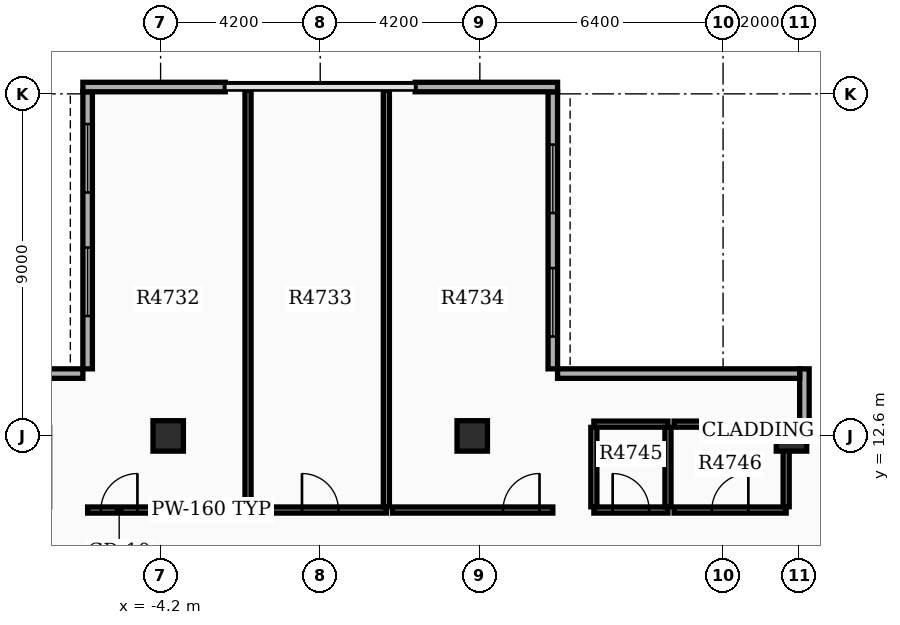
"""IFC4 building model, lengths in metres.
Left out: names, types, materials, properties, quantities, classifications, styles, units other than length and angle.
Written with IfcOpenShell. Run it as: python <this file> out.ifc"""

import sys

from ifc_helpers import new_model, si_unit, direction, frame, frame_2d, origin, origin_2d, place, context, subcontext, project, spatial, rectangle, extrude, element, fill, save


model = new_model("IFC4")
c1 = context("Model", 3, precision=1e-05, world=origin(), true_north=direction((0.0, 1.0)))
c2 = subcontext(c1, "Body", "Model", "MODEL_VIEW")
j1 = project(units=[si_unit("LENGTHUNIT", "METRE"), si_unit("PLANEANGLEUNIT", "RADIAN")], contexts=[c1])
p1 = place(None, origin())
s1 = spatial("IfcSite", under=j1, at=p1, CompositionType="ELEMENT")
p2 = place(p1, origin())
s2 = spatial("IfcBuilding", under=s1, at=p2, CompositionType="ELEMENT")
p3 = place(p2, frame((0.0, 0.0, 308.4)))
s3 = spatial("IfcBuildingStorey", under=s2, at=p3, CompositionType="ELEMENT", Elevation=308.4)
for number, where, z_axis, x_axis in (
    (1, (12.4, 12.6, 0.0), (0.0, 0.0, 1.0), (1.0, 0.0, 0.0)),
    (2, (4.0, 12.6, 0.0), (0.0, 0.0, 1.0), (1.0, 0.0, 0.0)),
    (3, (-4.0, 12.6, 0.0), (0.0, 0.0, 1.0), (1.0, 0.0, 0.0)),
):
    element("IfcColumn", number, at=place(p3, frame(where, z_axis=z_axis, x_axis=x_axis)), inside=s3, PredefinedType="COLUMN", context=c2, shape_type="SweptSolid", body=[
        extrude(rectangle(XDim=0.8, YDim=0.8, at=origin_2d()), origin(), (0.0, 0.0, 1.0), 4.5),
    ])
p4 = place(p3, frame((6.12, 14.365, 0.0), z_axis=(0.0, 0.0, 1.0), x_axis=(0.0, 1.0, 0.0)))
e4 = element("IfcWall", 4, at=p4, inside=s3, PredefinedType="STANDARD", context=c2, shape_type="SweptSolid", body=[
    extrude(rectangle(XDim=7.29, YDim=0.25, at=frame_2d((3.645, 0.0))), origin(), (0.0, 0.0, 1.0), 3.73),
])
p5 = place(p4, frame((0.85, 0.0, 0.8)))
e5 = element("IfcOpeningElement", 5, at=p5, cuts=e4, PredefinedType="OPENING", context=c2, shape_type="SweptSolid", body=[
    extrude(rectangle(XDim=1.8, YDim=1.8, at=frame_2d((0.9, 0.9))), frame((0.0, 0.135, 0.0), z_axis=(0.0, -1.0, 0.0), x_axis=(1.0, 0.0, 0.0)), (0.0, 0.0, 1.0), 0.27),
])
p6 = place(p4, frame((4.1, 0.0, 0.8)))
e6 = element("IfcOpeningElement", 6, at=p6, cuts=e4, PredefinedType="OPENING", context=c2, shape_type="SweptSolid", body=[
    extrude(rectangle(XDim=1.8, YDim=1.8, at=frame_2d((0.9, 0.9))), frame((0.0, 0.135, 0.0), z_axis=(0.0, -1.0, 0.0), x_axis=(1.0, 0.0, 0.0)), (0.0, 0.0, 1.0), 0.27),
])
p7 = place(p3, frame((-6.12, 21.655, 0.0), z_axis=(0.0, 0.0, 1.0), x_axis=(0.0, -1.0, 0.0)))
e7 = element("IfcWall", 7, at=p7, inside=s3, PredefinedType="STANDARD", context=c2, shape_type="SweptSolid", body=[
    extrude(rectangle(XDim=7.29, YDim=0.25, at=frame_2d((3.645, 0.0))), origin(), (0.0, 0.0, 1.0), 3.73),
])
p8 = place(p7, frame((0.85, 0.0, 0.8)))
e8 = element("IfcOpeningElement", 8, at=p8, cuts=e7, PredefinedType="OPENING", context=c2, shape_type="SweptSolid", body=[
    extrude(rectangle(XDim=1.8, YDim=1.8, at=frame_2d((0.9, 0.9))), frame((0.0, 0.135, 0.0), z_axis=(0.0, -1.0, 0.0), x_axis=(1.0, 0.0, 0.0)), (0.0, 0.0, 1.0), 0.27),
])
p9 = place(p7, frame((4.1, 0.0, 0.8)))
e9 = element("IfcOpeningElement", 9, at=p9, cuts=e7, PredefinedType="OPENING", context=c2, shape_type="SweptSolid", body=[
    extrude(rectangle(XDim=1.8, YDim=1.8, at=frame_2d((0.9, 0.9))), frame((0.0, 0.135, 0.0), z_axis=(0.0, -1.0, 0.0), x_axis=(1.0, 0.0, 0.0)), (0.0, 0.0, 1.0), 0.27),
])
for number, where, z_axis, x_axis in (
    (10, (6.245, 21.78, 0.0), (0.0, 0.0, 1.0), (-1.0, 0.0, 0.0)),
    (11, (-2.498, 21.78, 0.0), (0.0, 0.0, 1.0), (-1.0, 0.0, 0.0)),
):
    element("IfcWall", number, at=place(p3, frame(where, z_axis=z_axis, x_axis=x_axis)), inside=s3, PredefinedType="STANDARD", context=c2, shape_type="SweptSolid", body=[
        extrude(rectangle(XDim=3.747, YDim=0.25, at=frame_2d((1.874, 0.0))), origin(), (0.0, 0.0, 1.0), 3.73),
    ])
p10 = place(p3, frame((14.115, 12.74, 0.0), z_axis=(0.0, 0.0, 1.0), x_axis=(-1.0, 0.0, 0.0)))
e12 = element("IfcWall", 12, at=p10, inside=s3, PredefinedType="STANDARD", context=c2, shape_type="SweptSolid", body=[
    extrude(rectangle(XDim=1.25, YDim=0.25, at=frame_2d((0.625, 0.0))), origin(), (0.0, 0.0, 1.0), 3.73),
])
p11 = place(p3, frame((12.74, 12.865, 0.0), z_axis=(0.0, 0.0, 1.0), x_axis=(0.0, 1.0, 0.0)))
e13 = element("IfcWall", 13, at=p11, inside=s3, PredefinedType="STANDARD", context=c2, shape_type="SweptSolid", body=[
    extrude(rectangle(XDim=1.5, YDim=0.25, at=frame_2d((0.75, 0.0))), origin(), (0.0, 0.0, 1.0), 3.73),
])
for number, where, z_axis, x_axis in (
    (14, (12.615, 14.24, 0.0), (0.0, 0.0, 1.0), (-1.0, 0.0, 0.0)),
    (15, (-12.615, 14.24, 0.0), (0.0, 0.0, 1.0), (1.0, 0.0, 0.0)),
):
    element("IfcWall", number, at=place(p3, frame(where, z_axis=z_axis, x_axis=x_axis)), inside=s3, PredefinedType="STANDARD", context=c2, shape_type="SweptSolid", body=[
        extrude(rectangle(XDim=6.37, YDim=0.25, at=frame_2d((3.185, 0.0))), origin(), (0.0, 0.0, 1.0), 3.73),
    ])
p12 = place(p3, frame((-6.12, 10.65, 0.0), z_axis=(0.0, 0.0, 1.0), x_axis=(1.0, 0.0, 0.0)))
e16 = element("IfcWall", 16, at=p12, inside=s3, PredefinedType="PARTITIONING", context=c2, shape_type="SweptSolid", body=[
    extrude(rectangle(XDim=4.22, YDim=0.16, at=frame_2d((2.11, 0.0))), origin(), (0.0, 0.0, 1.0), 3.72),
])
p13 = place(p12, frame((0.35, 0.0, 0.0)))
e17 = element("IfcOpeningElement", 17, at=p13, cuts=e16, PredefinedType="OPENING", context=c2, shape_type="SweptSolid", body=[
    extrude(rectangle(XDim=0.96, YDim=2.15, at=frame_2d((0.48, 1.075))), frame((0.0, 0.09, 0.0), z_axis=(0.0, -1.0, 0.0), x_axis=(1.0, 0.0, 0.0)), (0.0, 0.0, 1.0), 0.18),
])
p14 = place(p3, frame((-1.9, 10.735, 0.0), z_axis=(0.0, 0.0, 1.0), x_axis=(0.0, 1.0, 0.0)))
e18 = element("IfcWall", 18, at=p14, inside=s3, PredefinedType="PARTITIONING", context=c2, shape_type="SweptSolid", body=[
    extrude(rectangle(XDim=10.96, YDim=0.16, at=frame_2d((5.48, 0.0))), origin(), (0.0, 0.0, 1.0), 3.72),
])
p15 = place(p3, frame((-1.74, 10.65, 0.0), z_axis=(0.0, 0.0, 1.0), x_axis=(1.0, 0.0, 0.0)))
e19 = element("IfcWall", 19, at=p15, inside=s3, PredefinedType="PARTITIONING", context=c2, shape_type="SweptSolid", body=[
    extrude(rectangle(XDim=3.48, YDim=0.16, at=frame_2d((1.74, 0.0))), origin(), (0.0, 0.0, 1.0), 3.72),
])
p16 = place(p15, frame((1.26, 0.0, 0.0)))
e20 = element("IfcOpeningElement", 20, at=p16, cuts=e19, PredefinedType="OPENING", context=c2, shape_type="SweptSolid", body=[
    extrude(rectangle(XDim=0.96, YDim=2.15, at=frame_2d((0.48, 1.075))), frame((0.0, 0.09, 0.0), z_axis=(0.0, -1.0, 0.0), x_axis=(1.0, 0.0, 0.0)), (0.0, 0.0, 1.0), 0.18),
])
p17 = place(p3, frame((1.74, 10.735, 0.0), z_axis=(0.0, 0.0, 1.0), x_axis=(0.0, 1.0, 0.0)))
e21 = element("IfcWall", 21, at=p17, inside=s3, PredefinedType="PARTITIONING", context=c2, shape_type="SweptSolid", body=[
    extrude(rectangle(XDim=10.96, YDim=0.16, at=frame_2d((5.48, 0.0))), origin(), (0.0, 0.0, 1.0), 3.72),
])
p18 = place(p3, frame((1.9, 10.65, 0.0), z_axis=(0.0, 0.0, 1.0), x_axis=(1.0, 0.0, 0.0)))
e22 = element("IfcWall", 22, at=p18, inside=s3, PredefinedType="PARTITIONING", context=c2, shape_type="SweptSolid", body=[
    extrude(rectangle(XDim=4.22, YDim=0.16, at=frame_2d((2.11, 0.0))), origin(), (0.0, 0.0, 1.0), 3.72),
])
p19 = place(p18, frame((2.91, 0.0, 0.0)))
e23 = element("IfcOpeningElement", 23, at=p19, cuts=e22, PredefinedType="OPENING", context=c2, shape_type="SweptSolid", body=[
    extrude(rectangle(XDim=0.96, YDim=2.15, at=frame_2d((0.48, 1.075))), frame((0.0, 0.09, 0.0), z_axis=(0.0, -1.0, 0.0), x_axis=(1.0, 0.0, 0.0)), (0.0, 0.0, 1.0), 0.18),
])
p20 = place(p3, frame((7.2, 10.65, 0.0), z_axis=(0.0, 0.0, 1.0), x_axis=(1.0, 0.0, 0.0)))
e24 = element("IfcWall", 24, at=p20, inside=s3, PredefinedType="PARTITIONING", context=c2, shape_type="SweptSolid", body=[
    extrude(rectangle(XDim=1.95, YDim=0.16, at=frame_2d((0.975, 0.0))), origin(), (0.0, 0.0, 1.0), 3.72),
])
p21 = place(p20, frame((0.495, 0.0, 0.0)))
e25 = element("IfcOpeningElement", 25, at=p21, cuts=e24, PredefinedType="OPENING", context=c2, shape_type="SweptSolid", body=[
    extrude(rectangle(XDim=0.96, YDim=2.15, at=frame_2d((0.48, 1.075))), frame((0.0, 0.09, 0.0), z_axis=(0.0, -1.0, 0.0), x_axis=(1.0, 0.0, 0.0)), (0.0, 0.0, 1.0), 0.18),
])
p22 = place(p3, frame((7.2, 12.91, 0.0), z_axis=(0.0, 0.0, 1.0), x_axis=(1.0, 0.0, 0.0)))
e26 = element("IfcWall", 26, at=p22, inside=s3, PredefinedType="PARTITIONING", context=c2, shape_type="SweptSolid", body=[
    extrude(rectangle(XDim=1.95, YDim=0.16, at=frame_2d((0.975, 0.0))), origin(), (0.0, 0.0, 1.0), 3.72),
])
for number, where, z_axis, x_axis in (
    (27, (7.2, 10.735, 0.0), (0.0, 0.0, 1.0), (0.0, 1.0, 0.0)),
    (28, (9.15, 10.735, 0.0), (0.0, 0.0, 1.0), (0.0, 1.0, 0.0)),
):
    element("IfcWall", number, at=place(p3, frame(where, z_axis=z_axis, x_axis=x_axis)), inside=s3, PredefinedType="PARTITIONING", context=c2, shape_type="SweptSolid", body=[
        extrude(rectangle(XDim=2.09, YDim=0.16, at=frame_2d((1.045, 0.0))), origin(), (0.0, 0.0, 1.0), 3.72),
    ])
p23 = place(p3, frame((9.31, 10.65, 0.0), z_axis=(0.0, 0.0, 1.0), x_axis=(1.0, 0.0, 0.0)))
e29 = element("IfcWall", 29, at=p23, inside=s3, PredefinedType="PARTITIONING", context=c2, shape_type="SweptSolid", body=[
    extrude(rectangle(XDim=2.95, YDim=0.16, at=frame_2d((1.475, 0.0))), origin(), (0.0, 0.0, 1.0), 3.72),
])
p24 = place(p23, frame((0.995, 0.0, 0.0)))
e30 = element("IfcOpeningElement", 30, at=p24, cuts=e29, PredefinedType="OPENING", context=c2, shape_type="SweptSolid", body=[
    extrude(rectangle(XDim=0.96, YDim=2.15, at=frame_2d((0.48, 1.075))), frame((0.0, 0.09, 0.0), z_axis=(0.0, -1.0, 0.0), x_axis=(1.0, 0.0, 0.0)), (0.0, 0.0, 1.0), 0.18),
])
p25 = place(p3, frame((9.31, 12.91, 0.0), z_axis=(0.0, 0.0, 1.0), x_axis=(1.0, 0.0, 0.0)))
e31 = element("IfcWall", 31, at=p25, inside=s3, PredefinedType="PARTITIONING", context=c2, shape_type="SweptSolid", body=[
    extrude(rectangle(XDim=2.95, YDim=0.16, at=frame_2d((1.475, 0.0))), origin(), (0.0, 0.0, 1.0), 3.72),
])
p26 = place(p3, frame((12.26, 10.735, 0.0), z_axis=(0.0, 0.0, 1.0), x_axis=(0.0, 1.0, 0.0)))
e32 = element("IfcWall", 32, at=p26, inside=s3, PredefinedType="PARTITIONING", context=c2, shape_type="SweptSolid", body=[
    extrude(rectangle(XDim=2.09, YDim=0.16, at=frame_2d((1.045, 0.0))), origin(), (0.0, 0.0, 1.0), 3.72),
])
p27 = place(p5, origin())
e33 = element("IfcWindow", 33, at=p27, inside=s3, PartitioningType="SINGLE_PANEL", PredefinedType="WINDOW", context=c2, shape_type="SweptSolid", body=[
    extrude(rectangle(XDim=1.8, YDim=1.8, at=frame_2d((0.9, 0.9))), frame((0.0, 0.03, 0.0), z_axis=(0.0, -1.0, 0.0), x_axis=(1.0, 0.0, 0.0)), (0.0, 0.0, 1.0), 0.06),
])
fill(e5, e33)
p28 = place(p6, origin())
e34 = element("IfcWindow", 34, at=p28, inside=s3, PartitioningType="SINGLE_PANEL", PredefinedType="WINDOW", context=c2, shape_type="SweptSolid", body=[
    extrude(rectangle(XDim=1.8, YDim=1.8, at=frame_2d((0.9, 0.9))), frame((0.0, 0.03, 0.0), z_axis=(0.0, -1.0, 0.0), x_axis=(1.0, 0.0, 0.0)), (0.0, 0.0, 1.0), 0.06),
])
fill(e6, e34)
p29 = place(p8, origin())
e35 = element("IfcWindow", 35, at=p29, inside=s3, PartitioningType="SINGLE_PANEL", PredefinedType="WINDOW", context=c2, shape_type="SweptSolid", body=[
    extrude(rectangle(XDim=1.8, YDim=1.8, at=frame_2d((0.9, 0.9))), frame((0.0, 0.03, 0.0), z_axis=(0.0, -1.0, 0.0), x_axis=(1.0, 0.0, 0.0)), (0.0, 0.0, 1.0), 0.06),
])
fill(e8, e35)
p30 = place(p9, origin())
e36 = element("IfcWindow", 36, at=p30, inside=s3, PartitioningType="SINGLE_PANEL", PredefinedType="WINDOW", context=c2, shape_type="SweptSolid", body=[
    extrude(rectangle(XDim=1.8, YDim=1.8, at=frame_2d((0.9, 0.9))), frame((0.0, 0.03, 0.0), z_axis=(0.0, -1.0, 0.0), x_axis=(1.0, 0.0, 0.0)), (0.0, 0.0, 1.0), 0.06),
])
fill(e9, e36)
p31 = place(p13, origin())
e37 = element("IfcDoor", 37, at=p31, inside=s3, OperationType="SINGLE_SWING_RIGHT", PredefinedType="DOOR", context=c2, shape_type="SweptSolid", body=[
    extrude(rectangle(XDim=0.96, YDim=2.15, at=frame_2d((0.48, 1.075))), frame((0.0, 0.025, 0.0), z_axis=(0.0, -1.0, 0.0), x_axis=(1.0, 0.0, 0.0)), (0.0, 0.0, 1.0), 0.05),
])
fill(e17, e37)
p32 = place(p16, origin())
e38 = element("IfcDoor", 38, at=p32, inside=s3, OperationType="SINGLE_SWING_LEFT", PredefinedType="DOOR", context=c2, shape_type="SweptSolid", body=[
    extrude(rectangle(XDim=0.96, YDim=2.15, at=frame_2d((0.48, 1.075))), frame((0.0, 0.025, 0.0), z_axis=(0.0, -1.0, 0.0), x_axis=(1.0, 0.0, 0.0)), (0.0, 0.0, 1.0), 0.05),
])
fill(e20, e38)
p33 = place(p19, origin())
e39 = element("IfcDoor", 39, at=p33, inside=s3, OperationType="SINGLE_SWING_RIGHT", PredefinedType="DOOR", context=c2, shape_type="SweptSolid", body=[
    extrude(rectangle(XDim=0.96, YDim=2.15, at=frame_2d((0.48, 1.075))), frame((0.0, 0.025, 0.0), z_axis=(0.0, -1.0, 0.0), x_axis=(1.0, 0.0, 0.0)), (0.0, 0.0, 1.0), 0.05),
])
fill(e23, e39)
p34 = place(p21, origin())
e40 = element("IfcDoor", 40, at=p34, inside=s3, OperationType="SINGLE_SWING_LEFT", PredefinedType="DOOR", context=c2, shape_type="SweptSolid", body=[
    extrude(rectangle(XDim=0.96, YDim=2.15, at=frame_2d((0.48, 1.075))), frame((0.0, 0.025, 0.0), z_axis=(0.0, -1.0, 0.0), x_axis=(1.0, 0.0, 0.0)), (0.0, 0.0, 1.0), 0.05),
])
fill(e25, e40)
p35 = place(p24, origin())
e41 = element("IfcDoor", 41, at=p35, inside=s3, OperationType="SINGLE_SWING_RIGHT", PredefinedType="DOOR", context=c2, shape_type="SweptSolid", body=[
    extrude(rectangle(XDim=0.96, YDim=2.15, at=frame_2d((0.48, 1.075))), frame((0.0, 0.025, 0.0), z_axis=(0.0, -1.0, 0.0), x_axis=(1.0, 0.0, 0.0)), (0.0, 0.0, 1.0), 0.05),
])
fill(e30, e41)
save(model, sys.argv[1])
